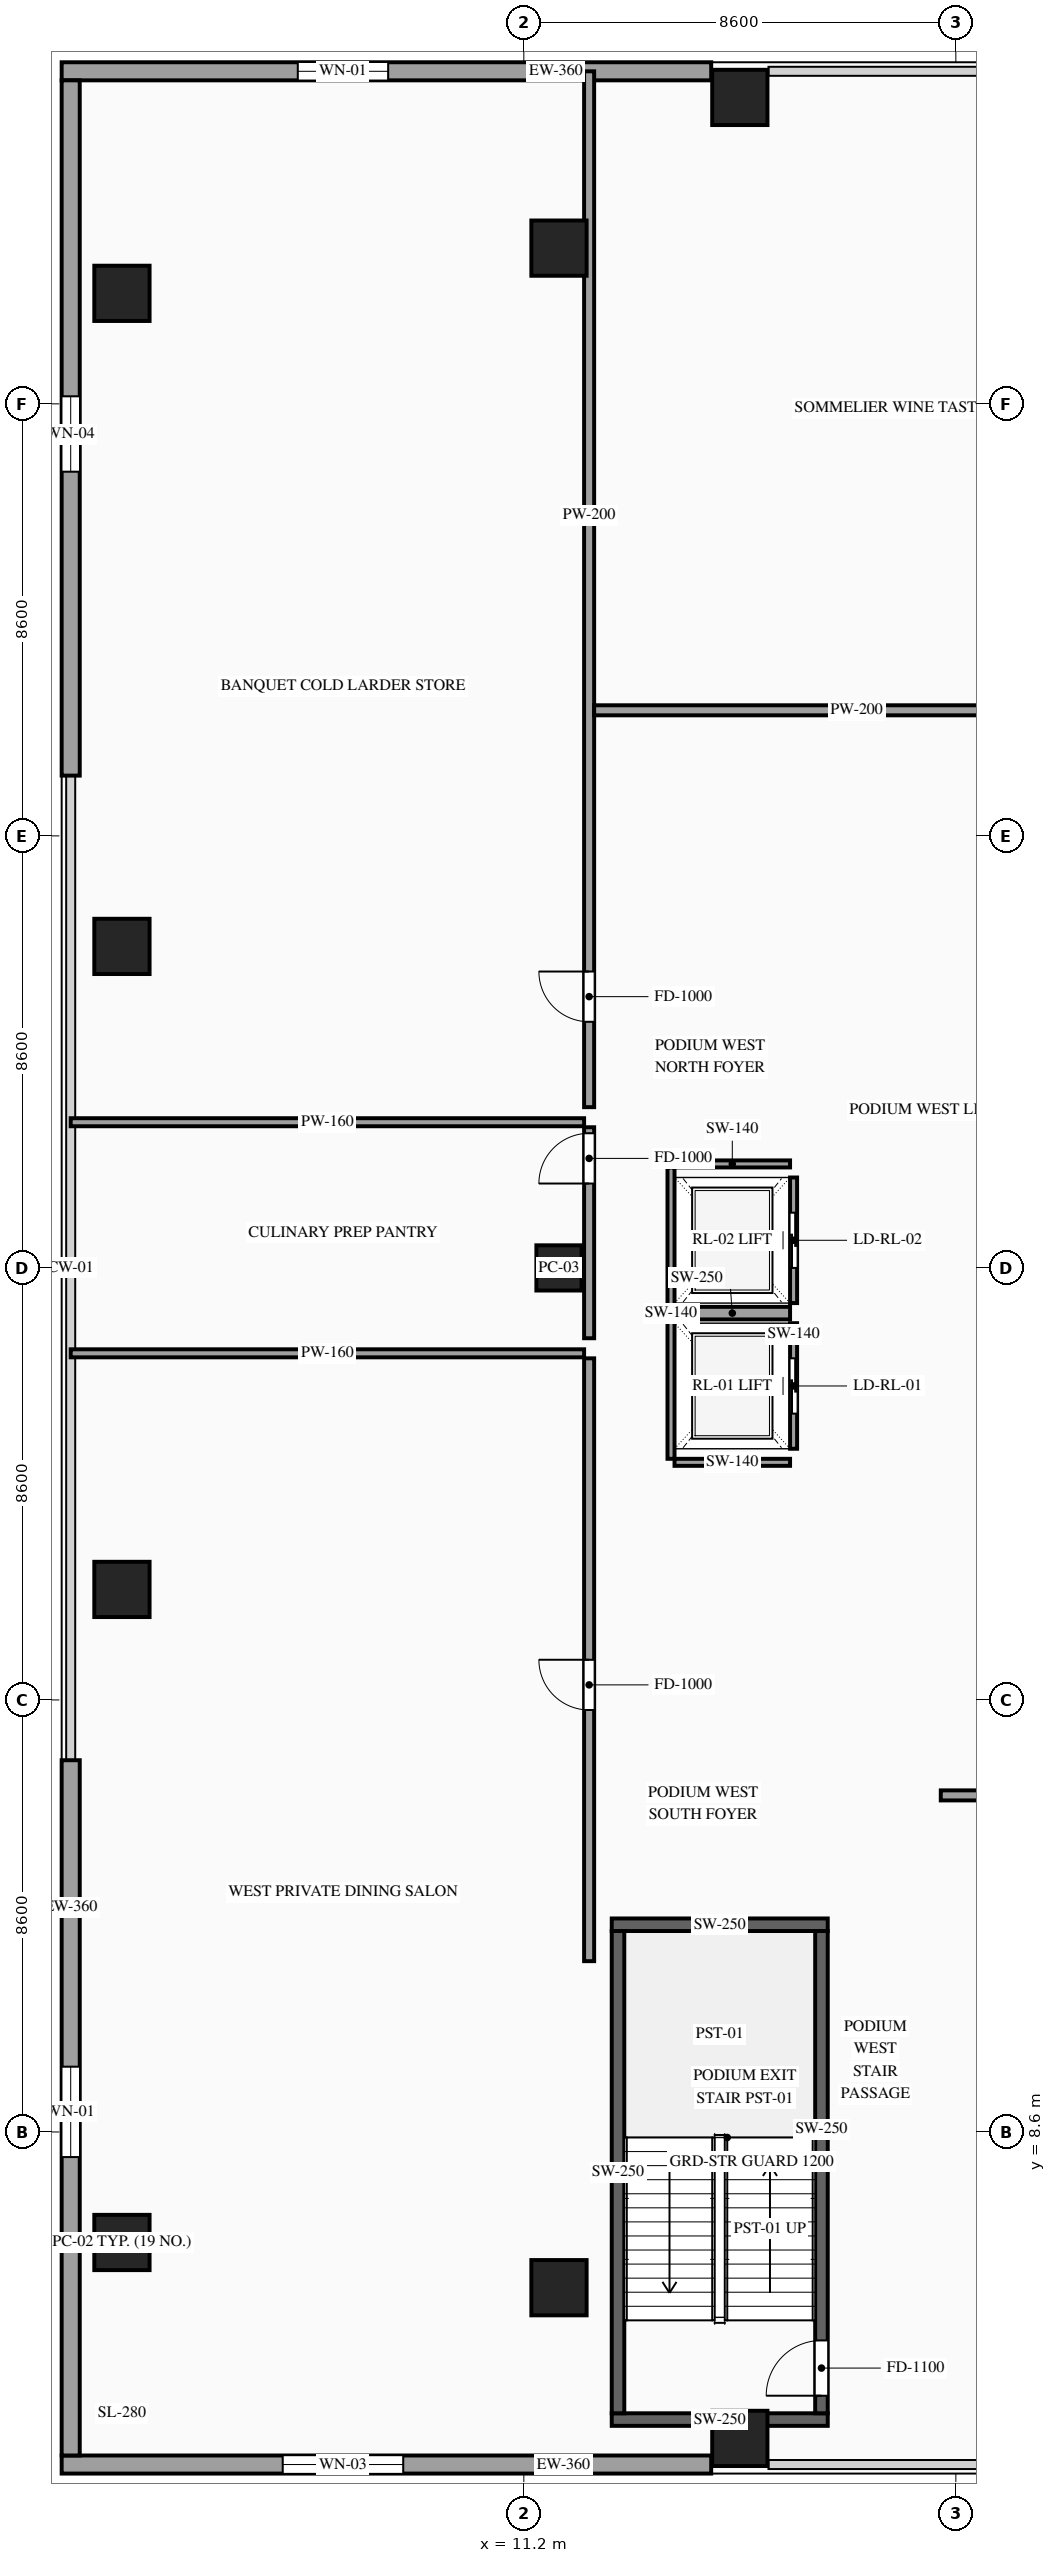
"""IFC4 building model, lengths in metres.
Left out: names, types, materials, properties, quantities, classifications, styles, units other than length and angle.
Written with IfcOpenShell. Run it as: python <this file> out.ifc"""

import sys

from ifc_helpers import new_model, si_unit, direction, frame, frame_2d, origin, origin_2d, place, context, subcontext, project, spatial, rectangle, extrude, source, transform, mapped, element, fill, save


model = new_model("IFC4")
c1 = context("Model", 3, precision=1e-05, world=origin(), true_north=direction((0.0, 1.0)))
c2 = subcontext(c1, "Body", "Model", "MODEL_VIEW")
j1 = project(units=[si_unit("LENGTHUNIT", "METRE"), si_unit("PLANEANGLEUNIT", "RADIAN")], contexts=[c1])
p1 = place(None, origin())
s1 = spatial("IfcSite", under=j1, at=p1, CompositionType="ELEMENT")
p2 = place(p1, origin())
s2 = spatial("IfcBuilding", under=s1, at=p2, CompositionType="ELEMENT")
p3 = place(p2, frame((0.0, 0.0, 10.2)))
s3 = spatial("IfcBuildingStorey", under=s2, at=p3, CompositionType="ELEMENT", Elevation=10.2)
m1 = source(origin(), c2, "Body", "SweptSolid", [
    extrude(rectangle(XDim=1.1, YDim=1.1, at=origin_2d()), origin(), (0.0, 0.0, 1.0), 4.8),
])
for number, where, z_axis, x_axis in (
    (1, (3.2, 6.4, 0.0), (0.0, 0.0, 1.0), (1.0, 0.0, 0.0)),
    (2, (3.2, 19.4, 0.0), (0.0, 0.0, 1.0), (1.0, 0.0, 0.0)),
    (3, (3.2, 32.2, 0.0), (0.0, 0.0, 1.0), (1.0, 0.0, 0.0)),
    (4, (3.2, 45.2, 0.0), (0.0, 0.0, 1.0), (1.0, 0.0, 0.0)),
    (5, (11.9, 5.5, 0.0), (0.0, 0.0, 1.0), (1.0, 0.0, 0.0)),
    (6, (11.9, 46.1, 0.0), (0.0, 0.0, 1.0), (1.0, 0.0, 0.0)),
    (7, (15.5, 2.5, 0.0), (0.0, 0.0, 1.0), (1.0, 0.0, 0.0)),
    (8, (15.5, 49.1, 0.0), (0.0, 0.0, 1.0), (1.0, 0.0, 0.0)),
):
    element("IfcColumn", number, at=place(p3, frame(where, z_axis=z_axis, x_axis=x_axis)), inside=s3, PredefinedType="COLUMN", context=c2, shape_type="MappedRepresentation", body=[
        mapped(m1, transform((0.0, 0.0, 0.0), scale=1.0)),
    ])
m2 = source(origin(), c2, "Body", "SweptSolid", [
    extrude(rectangle(XDim=0.9, YDim=0.9, at=origin_2d()), origin(), (0.0, 0.0, 1.0), 4.8),
])
p4 = place(p3, frame((11.9, 25.8, 0.0), z_axis=(0.0, 0.0, 1.0), x_axis=(1.0, 0.0, 0.0)))
e9 = element("IfcColumn", 9, at=p4, inside=s3, PredefinedType="COLUMN", context=c2, shape_type="MappedRepresentation", body=[
    mapped(m2, transform((0.0, 0.0, 0.0), scale=1.0)),
])
p5 = place(p3, frame((2.0, 1.98, 0.0), z_axis=(0.0, 0.0, 1.0), x_axis=(1.0, 0.0, 0.0)))
e10 = element("IfcWall", 10, at=p5, inside=s3, PredefinedType="SOLIDWALL", context=c2, shape_type="SweptSolid", body=[
    extrude(rectangle(XDim=12.93, YDim=0.36, at=frame_2d((6.465, 0.0))), origin(), (0.0, 0.0, 1.0), 4.52),
])
p6 = place(p5, frame((4.4, 0.0, 0.85)))
e11 = element("IfcOpeningElement", 11, at=p6, cuts=e10, PredefinedType="OPENING", context=c2, shape_type="SweptSolid", body=[
    extrude(rectangle(XDim=2.4, YDim=2.4, at=frame_2d((1.2, 1.2))), frame((0.0, 0.195, 0.0), z_axis=(0.0, -1.0, 0.0), x_axis=(1.0, 0.0, 0.0)), (0.0, 0.0, 1.0), 0.39),
])
p7 = place(p3, frame((2.0, 49.62, 0.0), z_axis=(0.0, 0.0, 1.0), x_axis=(1.0, 0.0, 0.0)))
e12 = element("IfcWall", 12, at=p7, inside=s3, PredefinedType="SOLIDWALL", context=c2, shape_type="SweptSolid", body=[
    extrude(rectangle(XDim=12.93, YDim=0.36, at=frame_2d((6.465, 0.0))), origin(), (0.0, 0.0, 1.0), 4.52),
])
p8 = place(p7, frame((4.7, 0.0, 0.9)))
e13 = element("IfcOpeningElement", 13, at=p8, cuts=e12, PredefinedType="OPENING", context=c2, shape_type="SweptSolid", body=[
    extrude(rectangle(XDim=1.8, YDim=2.2, at=frame_2d((0.9, 1.1))), frame((0.0, 0.195, 0.0), z_axis=(0.0, -1.0, 0.0), x_axis=(1.0, 0.0, 0.0)), (0.0, 0.0, 1.0), 0.39),
])
p9 = place(p3, frame((2.18, 2.16, 0.0), z_axis=(0.0, 0.0, 1.0), x_axis=(0.0, 1.0, 0.0)))
e14 = element("IfcWall", 14, at=p9, inside=s3, PredefinedType="SOLIDWALL", context=c2, shape_type="SweptSolid", body=[
    extrude(rectangle(XDim=13.84, YDim=0.36, at=frame_2d((6.92, 0.0))), origin(), (0.0, 0.0, 1.0), 4.52),
])
p10 = place(p9, frame((5.94, 0.0, 0.9)))
e15 = element("IfcOpeningElement", 15, at=p10, cuts=e14, PredefinedType="OPENING", context=c2, shape_type="SweptSolid", body=[
    extrude(rectangle(XDim=1.8, YDim=2.2, at=frame_2d((0.9, 1.1))), frame((0.0, 0.195, 0.0), z_axis=(0.0, -1.0, 0.0), x_axis=(1.0, 0.0, 0.0)), (0.0, 0.0, 1.0), 0.39),
])
p11 = place(p3, frame((2.18, 35.6, 0.0), z_axis=(0.0, 0.0, 1.0), x_axis=(0.0, 1.0, 0.0)))
e16 = element("IfcWall", 16, at=p11, inside=s3, PredefinedType="SOLIDWALL", context=c2, shape_type="SweptSolid", body=[
    extrude(rectangle(XDim=13.84, YDim=0.36, at=frame_2d((6.92, 0.0))), origin(), (0.0, 0.0, 1.0), 4.52),
])
p12 = place(p11, frame((6.05, 0.0, 0.9)))
e17 = element("IfcOpeningElement", 17, at=p12, cuts=e16, PredefinedType="OPENING", context=c2, shape_type="SweptSolid", body=[
    extrude(rectangle(XDim=1.5, YDim=1.8, at=frame_2d((0.75, 0.9))), frame((0.0, 0.195, 0.0), z_axis=(0.0, -1.0, 0.0), x_axis=(1.0, 0.0, 0.0)), (0.0, 0.0, 1.0), 0.39),
])
p13 = place(p3, frame((16.57, 22.2, 0.0), z_axis=(0.0, 0.0, 1.0), x_axis=(0.0, 1.0, 0.0)))
e18 = element("IfcWall", 18, at=p13, inside=s3, PredefinedType="SOLIDWALL", context=c2, shape_type="SweptSolid", body=[
    extrude(rectangle(XDim=2.5, YDim=0.14, at=frame_2d((1.25, 0.0))), origin(), (0.0, 0.0, 1.0), 4.52),
])
p14 = place(p13, frame((0.7, 0.0, 0.0)))
e19 = element("IfcOpeningElement", 19, at=p14, cuts=e18, PredefinedType="OPENING", context=c2, shape_type="SweptSolid", body=[
    extrude(rectangle(XDim=1.1, YDim=2.2, at=frame_2d((0.55, 1.1))), frame((0.0, 0.085, 0.0), z_axis=(0.0, -1.0, 0.0), x_axis=(1.0, 0.0, 0.0)), (0.0, 0.0, 1.0), 0.17),
])
m3 = source(origin(), c2, "Body", "SweptSolid", [
    extrude(rectangle(XDim=2.3, YDim=0.25, at=frame_2d((1.15, 0.0))), origin(), (0.0, 0.0, 1.0), 4.52),
])
p15 = place(p3, frame((14.2, 24.9, 0.0), z_axis=(0.0, 0.0, 1.0), x_axis=(1.0, 0.0, 0.0)))
e20 = element("IfcWall", 20, at=p15, inside=s3, PredefinedType="SOLIDWALL", context=c2, shape_type="MappedRepresentation", body=[
    mapped(m3, transform((0.0, 0.0, 0.0), scale=1.0)),
])
m4 = source(origin(), c2, "Body", "SweptSolid", [
    extrude(rectangle(XDim=5.8, YDim=0.14, at=frame_2d((2.9, 0.0))), origin(), (0.0, 0.0, 1.0), 4.52),
])
p16 = place(p3, frame((14.13, 22.0, 0.0), z_axis=(0.0, 0.0, 1.0), x_axis=(0.0, 1.0, 0.0)))
e21 = element("IfcWall", 21, at=p16, inside=s3, PredefinedType="SOLIDWALL", context=c2, shape_type="MappedRepresentation", body=[
    mapped(m4, transform((0.0, 0.0, 0.0), scale=1.0)),
])
m5 = source(origin(), c2, "Body", "SweptSolid", [
    extrude(rectangle(XDim=2.3, YDim=0.14, at=frame_2d((1.15, 0.0))), origin(), (0.0, 0.0, 1.0), 4.52),
])
p17 = place(p3, frame((14.2, 21.93, 0.0), z_axis=(0.0, 0.0, 1.0), x_axis=(1.0, 0.0, 0.0)))
e22 = element("IfcWall", 22, at=p17, inside=s3, PredefinedType="SOLIDWALL", context=c2, shape_type="MappedRepresentation", body=[
    mapped(m5, transform((0.0, 0.0, 0.0), scale=1.0)),
])
p18 = place(p3, frame((16.57, 25.1, 0.0), z_axis=(0.0, 0.0, 1.0), x_axis=(0.0, 1.0, 0.0)))
e23 = element("IfcWall", 23, at=p18, inside=s3, PredefinedType="SOLIDWALL", context=c2, shape_type="SweptSolid", body=[
    extrude(rectangle(XDim=2.5, YDim=0.14, at=frame_2d((1.25, 0.0))), origin(), (0.0, 0.0, 1.0), 4.52),
])
p19 = place(p18, frame((0.7, 0.0, 0.0)))
e24 = element("IfcOpeningElement", 24, at=p19, cuts=e23, PredefinedType="OPENING", context=c2, shape_type="SweptSolid", body=[
    extrude(rectangle(XDim=1.1, YDim=2.2, at=frame_2d((0.55, 1.1))), frame((0.0, 0.085, 0.0), z_axis=(0.0, -1.0, 0.0), x_axis=(1.0, 0.0, 0.0)), (0.0, 0.0, 1.0), 0.17),
])
p20 = place(p3, frame((14.2, 27.87, 0.0), z_axis=(0.0, 0.0, 1.0), x_axis=(1.0, 0.0, 0.0)))
e25 = element("IfcWall", 25, at=p20, inside=s3, PredefinedType="SOLIDWALL", context=c2, shape_type="MappedRepresentation", body=[
    mapped(m5, transform((0.0, 0.0, 0.0), scale=1.0)),
])
m6 = source(origin(), c2, "Body", "SweptSolid", [
    extrude(rectangle(XDim=4.3, YDim=0.25, at=frame_2d((2.15, 0.0))), origin(), (0.0, 0.0, 1.0), 4.52),
])
for number, where, z_axis, x_axis in (
    (26, (12.95, 2.875, 0.0), (0.0, 0.0, 1.0), (1.0, 0.0, 0.0)),
    (27, (12.95, 12.725, 0.0), (0.0, 0.0, 1.0), (1.0, 0.0, 0.0)),
):
    element("IfcWall", number, at=place(p3, frame(where, z_axis=z_axis, x_axis=x_axis)), inside=s3, PredefinedType="SOLIDWALL", context=c2, shape_type="MappedRepresentation", body=[
        mapped(m6, transform((0.0, 0.0, 0.0), scale=1.0)),
    ])
m7 = source(origin(), c2, "Body", "SweptSolid", [
    extrude(rectangle(XDim=9.6, YDim=0.25, at=frame_2d((4.8, 0.0))), origin(), (0.0, 0.0, 1.0), 4.52),
])
p21 = place(p3, frame((13.075, 3.0, 0.0), z_axis=(0.0, 0.0, 1.0), x_axis=(0.0, 1.0, 0.0)))
e28 = element("IfcWall", 28, at=p21, inside=s3, PredefinedType="SOLIDWALL", context=c2, shape_type="MappedRepresentation", body=[
    mapped(m7, transform((0.0, 0.0, 0.0), scale=1.0)),
])
p22 = place(p3, frame((17.125, 3.0, 0.0), z_axis=(0.0, 0.0, 1.0), x_axis=(0.0, 1.0, 0.0)))
e29 = element("IfcWall", 29, at=p22, inside=s3, PredefinedType="SOLIDWALL", context=c2, shape_type="SweptSolid", body=[
    extrude(rectangle(XDim=9.6, YDim=0.25, at=frame_2d((4.8, 0.0))), origin(), (0.0, 0.0, 1.0), 4.52),
])
p23 = place(p22, frame((0.35, 0.0, 0.0)))
e30 = element("IfcOpeningElement", 30, at=p23, cuts=e29, PredefinedType="OPENING", context=c2, shape_type="SweptSolid", body=[
    extrude(rectangle(XDim=1.1, YDim=2.2, at=frame_2d((0.55, 1.1))), frame((0.0, 0.14, 0.0), z_axis=(0.0, -1.0, 0.0), x_axis=(1.0, 0.0, 0.0)), (0.0, 0.0, 1.0), 0.28),
])
p24 = place(p3, frame((19.5, 15.3, 0.0), z_axis=(0.0, 0.0, 1.0), x_axis=(1.0, 0.0, 0.0)))
e31 = element("IfcWall", 31, at=p24, inside=s3, PredefinedType="PARTITIONING", context=c2, shape_type="SweptSolid", body=[
    extrude(rectangle(XDim=35.0, YDim=0.2, at=frame_2d((17.5, 0.0))), origin(), (0.0, 0.0, 1.0), 4.52),
])
p25 = place(p24, frame((13.5, 0.0, 0.0)))
e32 = element("IfcOpeningElement", 32, at=p25, cuts=e31, PredefinedType="OPENING", context=c2, shape_type="SweptSolid", body=[
    extrude(rectangle(XDim=1.0, YDim=2.2, at=frame_2d((0.5, 1.1))), frame((0.0, 0.115, 0.0), z_axis=(0.0, -1.0, 0.0), x_axis=(1.0, 0.0, 0.0)), (0.0, 0.0, 1.0), 0.23),
])
p26 = place(p3, frame((12.5, 12.0, 0.0), z_axis=(0.0, 0.0, 1.0), x_axis=(0.0, 1.0, 0.0)))
e33 = element("IfcWall", 33, at=p26, inside=s3, PredefinedType="PARTITIONING", context=c2, shape_type="SweptSolid", body=[
    extrude(rectangle(XDim=12.0, YDim=0.2, at=frame_2d((6.0, 0.0))), origin(), (0.0, 0.0, 1.0), 4.52),
])
p27 = place(p26, frame((5.0, 0.0, 0.0)))
e34 = element("IfcOpeningElement", 34, at=p27, cuts=e33, PredefinedType="OPENING", context=c2, shape_type="SweptSolid", body=[
    extrude(rectangle(XDim=1.0, YDim=2.2, at=frame_2d((0.5, 1.1))), frame((0.0, 0.115, 0.0), z_axis=(0.0, -1.0, 0.0), x_axis=(1.0, 0.0, 0.0)), (0.0, 0.0, 1.0), 0.23),
])
m8 = source(origin(), c2, "Body", "SweptSolid", [
    extrude(rectangle(XDim=10.22, YDim=0.16, at=frame_2d((5.11, 0.0))), origin(), (0.0, 0.0, 1.0), 4.52),
])
p28 = place(p3, frame((2.18, 24.1, 0.0), z_axis=(0.0, 0.0, 1.0), x_axis=(1.0, 0.0, 0.0)))
e35 = element("IfcWall", 35, at=p28, inside=s3, PredefinedType="PARTITIONING", context=c2, shape_type="MappedRepresentation", body=[
    mapped(m8, transform((0.0, 0.0, 0.0), scale=1.0)),
])
p29 = place(p3, frame((12.5, 24.4, 0.0), z_axis=(0.0, 0.0, 1.0), x_axis=(0.0, 1.0, 0.0)))
e36 = element("IfcWall", 36, at=p29, inside=s3, PredefinedType="PARTITIONING", context=c2, shape_type="SweptSolid", body=[
    extrude(rectangle(XDim=4.2, YDim=0.2, at=frame_2d((2.1, 0.0))), origin(), (0.0, 0.0, 1.0), 4.52),
])
p30 = place(p29, frame((3.08, 0.0, 0.0)))
e37 = element("IfcOpeningElement", 37, at=p30, cuts=e36, PredefinedType="OPENING", context=c2, shape_type="SweptSolid", body=[
    extrude(rectangle(XDim=1.0, YDim=2.2, at=frame_2d((0.5, 1.1))), frame((0.0, 0.115, 0.0), z_axis=(0.0, -1.0, 0.0), x_axis=(1.0, 0.0, 0.0)), (0.0, 0.0, 1.0), 0.23),
])
p31 = place(p3, frame((2.18, 28.7, 0.0), z_axis=(0.0, 0.0, 1.0), x_axis=(1.0, 0.0, 0.0)))
e38 = element("IfcWall", 38, at=p31, inside=s3, PredefinedType="PARTITIONING", context=c2, shape_type="MappedRepresentation", body=[
    mapped(m8, transform((0.0, 0.0, 0.0), scale=1.0)),
])
p32 = place(p3, frame((12.5, 29.0, 0.0), z_axis=(0.0, 0.0, 1.0), x_axis=(0.0, 1.0, 0.0)))
e39 = element("IfcWall", 39, at=p32, inside=s3, PredefinedType="PARTITIONING", context=c2, shape_type="SweptSolid", body=[
    extrude(rectangle(XDim=20.62, YDim=0.2, at=frame_2d((10.31, 0.0))), origin(), (0.0, 0.0, 1.0), 4.52),
])
p33 = place(p32, frame((1.7, 0.0, 0.0)))
e40 = element("IfcOpeningElement", 40, at=p33, cuts=e39, PredefinedType="OPENING", context=c2, shape_type="SweptSolid", body=[
    extrude(rectangle(XDim=1.0, YDim=2.2, at=frame_2d((0.5, 1.1))), frame((0.0, 0.115, 0.0), z_axis=(0.0, -1.0, 0.0), x_axis=(1.0, 0.0, 0.0)), (0.0, 0.0, 1.0), 0.23),
])
p34 = place(p3, frame((12.6, 36.9, 0.0), z_axis=(0.0, 0.0, 1.0), x_axis=(1.0, 0.0, 0.0)))
e41 = element("IfcWall", 41, at=p34, inside=s3, PredefinedType="PARTITIONING", context=c2, shape_type="SweptSolid", body=[
    extrude(rectangle(XDim=22.4, YDim=0.2, at=frame_2d((11.2, 0.0))), origin(), (0.0, 0.0, 1.0), 4.52),
])
p35 = place(p34, frame((10.7, 0.0, 0.0)))
e42 = element("IfcOpeningElement", 42, at=p35, cuts=e41, PredefinedType="OPENING", context=c2, shape_type="SweptSolid", body=[
    extrude(rectangle(XDim=1.0, YDim=2.2, at=frame_2d((0.5, 1.1))), frame((0.0, 0.115, 0.0), z_axis=(0.0, -1.0, 0.0), x_axis=(1.0, 0.0, 0.0)), (0.0, 0.0, 1.0), 0.23),
])
m9 = source(origin(), c2, "Body", "SweptSolid", [
    extrude(rectangle(XDim=2.4, YDim=2.4, at=frame_2d((1.2, 1.2))), frame((0.0, 0.03, 0.0), z_axis=(0.0, -1.0, 0.0), x_axis=(1.0, 0.0, 0.0)), (0.0, 0.0, 1.0), 0.06),
])
p36 = place(p6, origin())
e43 = element("IfcWindow", 43, at=p36, inside=s3, PartitioningType="SINGLE_PANEL", PredefinedType="WINDOW", context=c2, shape_type="MappedRepresentation", body=[
    mapped(m9, transform((0.0, 0.0, 0.0), scale=1.0)),
])
fill(e11, e43)
m10 = source(origin(), c2, "Body", "SweptSolid", [
    extrude(rectangle(XDim=1.8, YDim=2.2, at=frame_2d((0.9, 1.1))), frame((0.0, 0.03, 0.0), z_axis=(0.0, -1.0, 0.0), x_axis=(1.0, 0.0, 0.0)), (0.0, 0.0, 1.0), 0.06),
])
p37 = place(p8, origin())
e44 = element("IfcWindow", 44, at=p37, inside=s3, PartitioningType="SINGLE_PANEL", PredefinedType="WINDOW", context=c2, shape_type="MappedRepresentation", body=[
    mapped(m10, transform((0.0, 0.0, 0.0), scale=1.0)),
])
fill(e13, e44)
p38 = place(p10, origin())
e45 = element("IfcWindow", 45, at=p38, inside=s3, PartitioningType="SINGLE_PANEL", PredefinedType="WINDOW", context=c2, shape_type="MappedRepresentation", body=[
    mapped(m10, transform((0.0, 0.0, 0.0), scale=1.0)),
])
fill(e15, e45)
m11 = source(origin(), c2, "Body", "SweptSolid", [
    extrude(rectangle(XDim=1.5, YDim=1.8, at=frame_2d((0.75, 0.9))), frame((0.0, 0.03, 0.0), z_axis=(0.0, -1.0, 0.0), x_axis=(1.0, 0.0, 0.0)), (0.0, 0.0, 1.0), 0.06),
])
p39 = place(p12, origin())
e46 = element("IfcWindow", 46, at=p39, inside=s3, PartitioningType="SINGLE_PANEL", PredefinedType="WINDOW", context=c2, shape_type="MappedRepresentation", body=[
    mapped(m11, transform((0.0, 0.0, 0.0), scale=1.0)),
])
fill(e17, e46)
m12 = source(origin(), c2, "Body", "SweptSolid", [
    extrude(rectangle(XDim=1.1, YDim=2.2, at=frame_2d((0.55, 1.1))), frame((0.0, 0.025, 0.0), z_axis=(0.0, -1.0, 0.0), x_axis=(1.0, 0.0, 0.0)), (0.0, 0.0, 1.0), 0.05),
])
p40 = place(p14, origin())
e47 = element("IfcDoor", 47, at=p40, inside=s3, OperationType="SLIDING_TO_RIGHT", PredefinedType="DOOR", context=c2, shape_type="MappedRepresentation", body=[
    mapped(m12, transform((0.0, 0.0, 0.0), scale=1.0)),
])
fill(e19, e47)
p41 = place(p19, origin())
e48 = element("IfcDoor", 48, at=p41, inside=s3, OperationType="SLIDING_TO_LEFT", PredefinedType="DOOR", context=c2, shape_type="MappedRepresentation", body=[
    mapped(m12, transform((0.0, 0.0, 0.0), scale=1.0)),
])
fill(e24, e48)
m13 = source(origin(), c2, "Body", "SweptSolid", [
    extrude(rectangle(XDim=1.1, YDim=2.2, at=frame_2d((0.55, 1.1))), frame((0.0, 0.025, 0.0), z_axis=(0.0, -1.0, 0.0), x_axis=(1.0, 0.0, 0.0)), (0.0, 0.0, 1.0), 0.05),
])
p42 = place(p23, origin())
e49 = element("IfcDoor", 49, at=p42, inside=s3, OperationType="SINGLE_SWING_LEFT", PredefinedType="DOOR", context=c2, shape_type="MappedRepresentation", body=[
    mapped(m13, transform((0.0, 0.0, 0.0), scale=1.0)),
])
fill(e30, e49)
m14 = source(origin(), c2, "Body", "SweptSolid", [
    extrude(rectangle(XDim=1.0, YDim=2.2, at=frame_2d((0.5, 1.1))), frame((0.0, 0.025, 0.0), z_axis=(0.0, -1.0, 0.0), x_axis=(1.0, 0.0, 0.0)), (0.0, 0.0, 1.0), 0.05),
])
p43 = place(p27, origin())
e50 = element("IfcDoor", 50, at=p43, inside=s3, OperationType="SINGLE_SWING_RIGHT", PredefinedType="DOOR", context=c2, shape_type="MappedRepresentation", body=[
    mapped(m14, transform((0.0, 0.0, 0.0), scale=1.0)),
])
fill(e34, e50)
p44 = place(p30, origin())
e51 = element("IfcDoor", 51, at=p44, inside=s3, OperationType="SINGLE_SWING_LEFT", PredefinedType="DOOR", context=c2, shape_type="MappedRepresentation", body=[
    mapped(m14, transform((0.0, 0.0, 0.0), scale=1.0)),
])
fill(e37, e51)
p45 = place(p33, origin())
e52 = element("IfcDoor", 52, at=p45, inside=s3, OperationType="SINGLE_SWING_RIGHT", PredefinedType="DOOR", context=c2, shape_type="MappedRepresentation", body=[
    mapped(m14, transform((0.0, 0.0, 0.0), scale=1.0)),
])
fill(e40, e52)
save(model, sys.argv[1])
